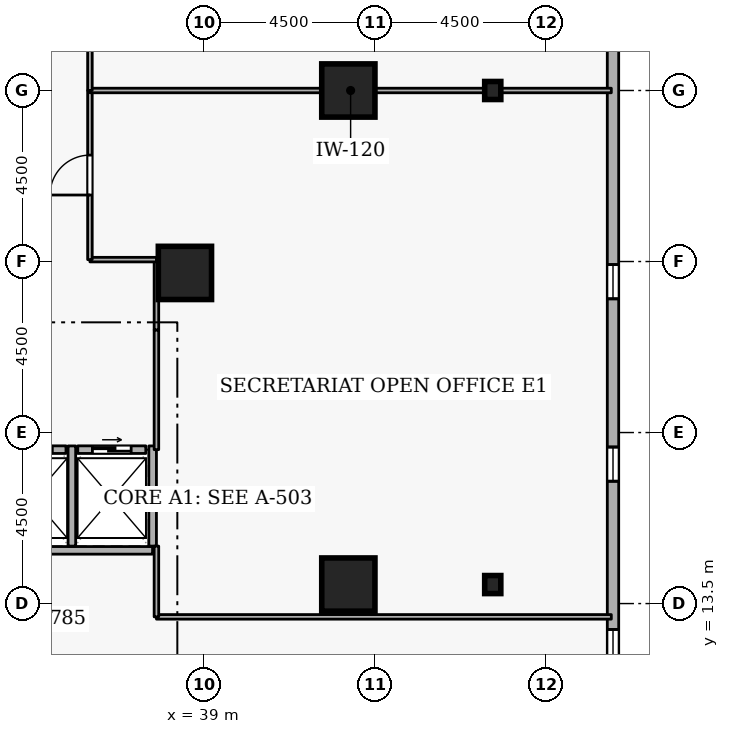
"""IFC4 building model, lengths in metres.
Left out: names, types, materials, properties, quantities, classifications, styles, units other than length and angle.
Written with IfcOpenShell. Run it as: python <this file> out.ifc"""

import sys

from ifc_helpers import new_model, si_unit, direction, frame, frame_2d, origin, origin_2d, place, context, subcontext, project, spatial, rectangle, i_section, extrude, element, fill, save


model = new_model("IFC4")
c1 = context("Model", 3, precision=1e-05, world=origin(), true_north=direction((0.0, 1.0)))
c2 = subcontext(c1, "Body", "Model", "MODEL_VIEW")
j1 = project(units=[si_unit("LENGTHUNIT", "METRE"), si_unit("PLANEANGLEUNIT", "RADIAN")], contexts=[c1])
p1 = place(None, origin())
s1 = spatial("IfcSite", under=j1, at=p1, CompositionType="ELEMENT")
p2 = place(p1, origin())
s2 = spatial("IfcBuilding", under=s1, at=p2, CompositionType="ELEMENT")
p3 = place(p2, frame((0.0, 0.0, 64.5)))
s3 = spatial("IfcBuildingStorey", under=s2, at=p3, CompositionType="ELEMENT", Elevation=64.5)
for number, where, z_axis, x_axis in (
    (1, (42.8, 14.0, 0.0), (0.0, 0.0, 1.0), (1.0, 0.0, 0.0)),
    (2, (42.8, 27.0, 0.0), (0.0, 0.0, 1.0), (1.0, 0.0, 0.0)),
    (3, (38.5, 22.2, 0.0), (0.0, 0.0, 1.0), (1.0, 0.0, 0.0)),
):
    element("IfcColumn", number, at=place(p3, frame(where, z_axis=z_axis, x_axis=x_axis)), inside=s3, PredefinedType="COLUMN", context=c2, shape_type="SweptSolid", body=[
        extrude(rectangle(XDim=1.4, YDim=1.4, at=origin_2d()), origin(), (0.0, 0.0, 1.0), 3.6),
    ])
for number, where, z_axis, x_axis in (
    (4, (46.6, 14.0, 0.0), (0.0, 0.0, 1.0), (1.0, 0.0, 0.0)),
    (5, (46.6, 27.0, 0.0), (0.0, 0.0, 1.0), (1.0, 0.0, 0.0)),
):
    element("IfcColumn", number, at=place(p3, frame(where, z_axis=z_axis, x_axis=x_axis)), inside=s3, PredefinedType="COLUMN", context=c2, shape_type="SweptSolid", body=[
        extrude(i_section(OverallWidth=0.424, OverallDepth=0.475, WebThickness=0.048, FlangeThickness=0.077, FilletRadius=0.015, at=origin_2d()), origin(), (0.0, 0.0, 1.0), 3.6),
    ])
p4 = place(p3, frame((49.765, 5.319, 0.0), z_axis=(0.0, 0.0, 1.0), x_axis=(-3.2959355e-05, 0.999999999457, 0.0)))
e6 = element("IfcWall", 6, at=p4, inside=s3, PredefinedType="STANDARD", context=c2, shape_type="SweptSolid", body=[
    extrude(rectangle(XDim=37.037, YDim=0.3, at=frame_2d((18.518, 0.0))), origin(), (0.0, 0.0, 1.0), 2.7),
])
p5 = place(p4, frame((1.8, 0.0, 0.72)))
e7 = element("IfcOpeningElement", 7, at=p5, cuts=e6, PredefinedType="OPENING", context=c2, shape_type="SweptSolid", body=[
    extrude(rectangle(XDim=0.9, YDim=1.75, at=frame_2d((0.45, 0.875))), frame((0.0, 0.16, 0.0), z_axis=(0.0, -1.0, 0.0), x_axis=(1.0, 0.0, 0.0)), (0.0, 0.0, 1.0), 0.32),
])
p6 = place(p4, frame((6.6, 0.0, 0.72)))
e8 = element("IfcOpeningElement", 8, at=p6, cuts=e6, PredefinedType="OPENING", context=c2, shape_type="SweptSolid", body=[
    extrude(rectangle(XDim=0.9, YDim=1.75, at=frame_2d((0.45, 0.875))), frame((0.0, 0.16, 0.0), z_axis=(0.0, -1.0, 0.0), x_axis=(1.0, 0.0, 0.0)), (0.0, 0.0, 1.0), 0.32),
])
p7 = place(p4, frame((11.4, 0.0, 0.72)))
e9 = element("IfcOpeningElement", 9, at=p7, cuts=e6, PredefinedType="OPENING", context=c2, shape_type="SweptSolid", body=[
    extrude(rectangle(XDim=0.9, YDim=1.75, at=frame_2d((0.45, 0.875))), frame((0.0, 0.16, 0.0), z_axis=(0.0, -1.0, 0.0), x_axis=(1.0, 0.0, 0.0)), (0.0, 0.0, 1.0), 0.32),
])
p8 = place(p4, frame((16.2, 0.0, 0.72)))
e10 = element("IfcOpeningElement", 10, at=p8, cuts=e6, PredefinedType="OPENING", context=c2, shape_type="SweptSolid", body=[
    extrude(rectangle(XDim=0.9, YDim=1.75, at=frame_2d((0.45, 0.875))), frame((0.0, 0.16, 0.0), z_axis=(0.0, -1.0, 0.0), x_axis=(1.0, 0.0, 0.0)), (0.0, 0.0, 1.0), 0.32),
])
p9 = place(p4, frame((25.8, 0.0, 0.72)))
e11 = element("IfcOpeningElement", 11, at=p9, cuts=e6, PredefinedType="OPENING", context=c2, shape_type="SweptSolid", body=[
    extrude(rectangle(XDim=0.9, YDim=1.75, at=frame_2d((0.45, 0.875))), frame((0.0, 0.16, 0.0), z_axis=(0.0, -1.0, 0.0), x_axis=(1.0, 0.0, 0.0)), (0.0, 0.0, 1.0), 0.32),
])
p10 = place(p4, frame((30.6, 0.0, 0.72)))
e12 = element("IfcOpeningElement", 12, at=p10, cuts=e6, PredefinedType="OPENING", context=c2, shape_type="SweptSolid", body=[
    extrude(rectangle(XDim=0.9, YDim=1.75, at=frame_2d((0.45, 0.875))), frame((0.0, 0.16, 0.0), z_axis=(0.0, -1.0, 0.0), x_axis=(1.0, 0.0, 0.0)), (0.0, 0.0, 1.0), 0.32),
])
p11 = place(p3, frame((33.63, 17.55, 0.0), z_axis=(0.0, 0.0, 1.0), x_axis=(1.0, 0.0, 0.0)))
e13 = element("IfcWall", 13, at=p11, inside=s3, PredefinedType="STANDARD", context=c2, shape_type="SweptSolid", body=[
    extrude(rectangle(XDim=1.74, YDim=0.2, at=frame_2d((0.87, 0.0))), origin(), (0.0, 0.0, 1.0), 3.34),
])
p12 = place(p11, frame((0.36, 0.0, 0.0)))
e14 = element("IfcOpeningElement", 14, at=p12, cuts=e13, PredefinedType="OPENING", context=c2, shape_type="SweptSolid", body=[
    extrude(rectangle(XDim=1.02, YDim=2.06, at=frame_2d((0.51, 1.03))), frame((0.0, 0.11, 0.0), z_axis=(0.0, -1.0, 0.0), x_axis=(1.0, 0.0, 0.0)), (0.0, 0.0, 1.0), 0.22),
])
p13 = place(p3, frame((35.68, 17.55, 0.0), z_axis=(0.0, 0.0, 1.0), x_axis=(1.0, 0.0, 0.0)))
e15 = element("IfcWall", 15, at=p13, inside=s3, PredefinedType="STANDARD", context=c2, shape_type="SweptSolid", body=[
    extrude(rectangle(XDim=1.79, YDim=0.2, at=frame_2d((0.895, 0.0))), origin(), (0.0, 0.0, 1.0), 3.34),
])
p14 = place(p13, frame((0.385, 0.0, 0.0)))
e16 = element("IfcOpeningElement", 16, at=p14, cuts=e15, PredefinedType="OPENING", context=c2, shape_type="SweptSolid", body=[
    extrude(rectangle(XDim=1.02, YDim=2.06, at=frame_2d((0.51, 1.03))), frame((0.0, 0.11, 0.0), z_axis=(0.0, -1.0, 0.0), x_axis=(1.0, 0.0, 0.0)), (0.0, 0.0, 1.0), 0.22),
])
p15 = place(p3, frame((33.452, 14.9, 0.0), z_axis=(0.0, 0.0, 1.0), x_axis=(1.0, 0.0, 0.0)))
e17 = element("IfcWall", 17, at=p15, inside=s3, PredefinedType="STANDARD", context=c2, shape_type="SweptSolid", body=[
    extrude(rectangle(XDim=4.196, YDim=0.2, at=frame_2d((2.098, 0.0))), origin(), (0.0, 0.0, 1.0), 3.34),
])
for number, where, z_axis, x_axis in (
    (18, (35.525, 15.012, 0.0), (0.0, 0.0, 1.0), (0.0, 1.0, 0.0)),
    (19, (37.65, 15.012, 0.0), (0.0, 0.0, 1.0), (0.0, 1.0, 0.0)),
):
    element("IfcWall", number, at=place(p3, frame(where, z_axis=z_axis, x_axis=x_axis)), inside=s3, PredefinedType="STANDARD", context=c2, shape_type="SweptSolid", body=[
        extrude(rectangle(XDim=2.636, YDim=0.2, at=frame_2d((1.318, 0.0))), origin(), (0.0, 0.0, 1.0), 3.34),
    ])
p16 = place(p3, frame((37.75, 17.55, 0.0), z_axis=(0.0, 0.0, 1.0), x_axis=(0.0, 1.0, 0.0)))
e20 = element("IfcWall", 20, at=p16, inside=s3, PredefinedType="PARTITIONING", context=c2, shape_type="SweptSolid", body=[
    extrude(rectangle(XDim=3.15, YDim=0.12, at=frame_2d((1.575, 0.0))), origin(), (0.0, 0.0, 1.0), 3.34),
])
p17 = place(p3, frame((37.75, 20.7, 0.0), z_axis=(0.0, 0.0, 1.0), x_axis=(0.0, 1.0, 0.0)))
e21 = element("IfcWall", 21, at=p17, inside=s3, PredefinedType="PARTITIONING", context=c2, shape_type="SweptSolid", body=[
    extrude(rectangle(XDim=1.85, YDim=0.12, at=frame_2d((0.925, 0.0))), origin(), (0.0, 0.0, 1.0), 3.34),
])
p18 = place(p3, frame((37.75, 22.55, 0.0), z_axis=(0.0, 0.0, 1.0), x_axis=(-1.0, 0.0, 0.0)))
e22 = element("IfcWall", 22, at=p18, inside=s3, PredefinedType="PARTITIONING", context=c2, shape_type="SweptSolid", body=[
    extrude(rectangle(XDim=1.75, YDim=0.12, at=frame_2d((0.875, 0.0))), origin(), (0.0, 0.0, 1.0), 3.34),
])
p19 = place(p3, frame((36.0, 22.55, 0.0), z_axis=(0.0, 0.0, 1.0), x_axis=(0.0, 1.0, 0.0)))
e23 = element("IfcWall", 23, at=p19, inside=s3, PredefinedType="PARTITIONING", context=c2, shape_type="SweptSolid", body=[
    extrude(rectangle(XDim=4.45, YDim=0.12, at=frame_2d((2.225, 0.0))), origin(), (0.0, 0.0, 1.0), 3.34),
])
p20 = place(p19, frame((1.7, 0.0, 0.0)))
e24 = element("IfcOpeningElement", 24, at=p20, cuts=e23, PredefinedType="OPENING", context=c2, shape_type="SweptSolid", body=[
    extrude(rectangle(XDim=1.05, YDim=2.1, at=frame_2d((0.525, 1.05))), frame((0.0, 0.07, 0.0), z_axis=(0.0, -1.0, 0.0), x_axis=(1.0, 0.0, 0.0)), (0.0, 0.0, 1.0), 0.14),
])
p21 = place(p3, frame((36.0, 27.0, 0.0), z_axis=(0.0, 0.0, 1.0), x_axis=(1.0, 0.0, 0.0)))
e25 = element("IfcWall", 25, at=p21, inside=s3, PredefinedType="PARTITIONING", context=c2, shape_type="SweptSolid", body=[
    extrude(rectangle(XDim=13.72, YDim=0.12, at=frame_2d((6.86, 0.0))), origin(), (0.0, 0.0, 1.0), 2.878),
])
p22 = place(p3, frame((49.72, 13.15, 0.0), z_axis=(0.0, 0.0, 1.0), x_axis=(-1.0, 0.0, 0.0)))
e26 = element("IfcWall", 26, at=p22, inside=s3, PredefinedType="PARTITIONING", context=c2, shape_type="SweptSolid", body=[
    extrude(rectangle(XDim=11.97, YDim=0.12, at=frame_2d((5.985, 0.0))), origin(), (0.0, 0.0, 1.0), 3.34),
])
p23 = place(p3, frame((37.75, 13.15, 0.0), z_axis=(0.0, 0.0, 1.0), x_axis=(0.0, 1.0, 0.0)))
e27 = element("IfcWall", 27, at=p23, inside=s3, PredefinedType="PARTITIONING", context=c2, shape_type="SweptSolid", body=[
    extrude(rectangle(XDim=1.862, YDim=0.12, at=frame_2d((0.931, 0.0))), origin(), (0.0, 0.0, 1.0), 3.34),
])
p24 = place(p3, frame((36.0, 27.0, 0.0), z_axis=(0.0, 0.0, 1.0), x_axis=(0.0, 1.0, 0.0)))
e28 = element("IfcWall", 28, at=p24, inside=s3, PredefinedType="PARTITIONING", context=c2, shape_type="SweptSolid", body=[
    extrude(rectangle(XDim=3.15, YDim=0.12, at=frame_2d((1.575, 0.0))), origin(), (0.0, 0.0, 1.0), 3.34),
])
p25 = place(p24, frame((1.1, 0.0, 0.0)))
e29 = element("IfcOpeningElement", 29, at=p25, cuts=e28, PredefinedType="OPENING", context=c2, shape_type="SweptSolid", body=[
    extrude(rectangle(XDim=0.95, YDim=2.1, at=frame_2d((0.475, 1.05))), frame((0.0, 0.07, 0.0), z_axis=(0.0, -1.0, 0.0), x_axis=(1.0, 0.0, 0.0)), (0.0, 0.0, 1.0), 0.14),
])
p26 = place(p6, origin())
e30 = element("IfcWindow", 30, at=p26, inside=s3, PartitioningType="SINGLE_PANEL", PredefinedType="WINDOW", context=c2, shape_type="SweptSolid", body=[
    extrude(rectangle(XDim=0.9, YDim=1.75, at=frame_2d((0.45, 0.875))), frame((0.0, 0.03, 0.0), z_axis=(0.0, -1.0, 0.0), x_axis=(1.0, 0.0, 0.0)), (0.0, 0.0, 1.0), 0.06),
])
fill(e8, e30)
p27 = place(p7, origin())
e31 = element("IfcWindow", 31, at=p27, inside=s3, PartitioningType="SINGLE_PANEL", PredefinedType="WINDOW", context=c2, shape_type="SweptSolid", body=[
    extrude(rectangle(XDim=0.9, YDim=1.75, at=frame_2d((0.45, 0.875))), frame((0.0, 0.03, 0.0), z_axis=(0.0, -1.0, 0.0), x_axis=(1.0, 0.0, 0.0)), (0.0, 0.0, 1.0), 0.06),
])
fill(e9, e31)
p28 = place(p8, origin())
e32 = element("IfcWindow", 32, at=p28, inside=s3, PartitioningType="SINGLE_PANEL", PredefinedType="WINDOW", context=c2, shape_type="SweptSolid", body=[
    extrude(rectangle(XDim=0.9, YDim=1.75, at=frame_2d((0.45, 0.875))), frame((0.0, 0.03, 0.0), z_axis=(0.0, -1.0, 0.0), x_axis=(1.0, 0.0, 0.0)), (0.0, 0.0, 1.0), 0.06),
])
fill(e10, e32)
p29 = place(p12, origin())
e33 = element("IfcDoor", 33, at=p29, inside=s3, OperationType="SLIDING_TO_LEFT", PredefinedType="DOOR", context=c2, shape_type="SweptSolid", body=[
    extrude(rectangle(XDim=1.02, YDim=2.06, at=frame_2d((0.51, 1.03))), frame((0.0, 0.025, 0.0), z_axis=(0.0, -1.0, 0.0), x_axis=(1.0, 0.0, 0.0)), (0.0, 0.0, 1.0), 0.05),
])
fill(e14, e33)
p30 = place(p14, origin())
e34 = element("IfcDoor", 34, at=p30, inside=s3, OperationType="SLIDING_TO_LEFT", PredefinedType="DOOR", context=c2, shape_type="SweptSolid", body=[
    extrude(rectangle(XDim=1.02, YDim=2.06, at=frame_2d((0.51, 1.03))), frame((0.0, 0.025, 0.0), z_axis=(0.0, -1.0, 0.0), x_axis=(1.0, 0.0, 0.0)), (0.0, 0.0, 1.0), 0.05),
])
fill(e16, e34)
p31 = place(p20, origin())
e35 = element("IfcDoor", 35, at=p31, inside=s3, OperationType="SINGLE_SWING_LEFT", PredefinedType="DOOR", context=c2, shape_type="SweptSolid", body=[
    extrude(rectangle(XDim=1.05, YDim=2.1, at=frame_2d((0.525, 1.05))), frame((0.0, 0.025, 0.0), z_axis=(0.0, -1.0, 0.0), x_axis=(1.0, 0.0, 0.0)), (0.0, 0.0, 1.0), 0.05),
])
fill(e24, e35)
save(model, sys.argv[1])
